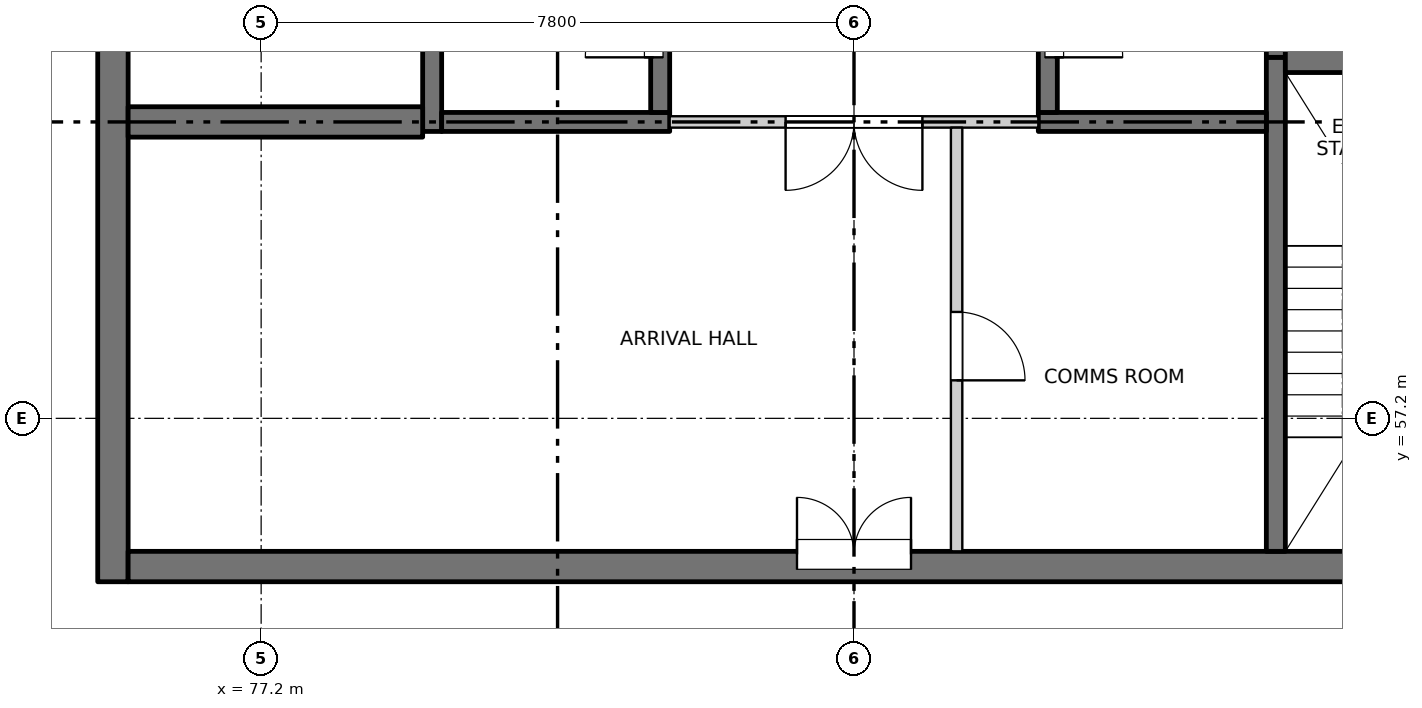
"""IFC4 building model, lengths in metres.
Left out: names, types, materials, properties, quantities, classifications, styles, units other than length and angle.
Written with IfcOpenShell. Run it as: python <this file> out.ifc"""

import sys

from ifc_helpers import new_model, si_unit, direction, frame, frame_2d, origin, place, context, subcontext, project, spatial, rectangle, extrude, element, fill, save


model = new_model("IFC4")
c1 = context("Model", 3, precision=1e-05, world=origin(), true_north=direction((0.0, 1.0)))
c2 = subcontext(c1, "Body", "Model", "MODEL_VIEW")
j1 = project(units=[si_unit("LENGTHUNIT", "METRE"), si_unit("PLANEANGLEUNIT", "RADIAN")], contexts=[c1])
p1 = place(None, origin())
s1 = spatial("IfcSite", under=j1, at=p1, CompositionType="ELEMENT")
p2 = place(p1, origin())
s2 = spatial("IfcBuilding", under=s1, at=p2, CompositionType="ELEMENT")
p3 = place(p2, frame((0.0, 0.0, 249.4)))
s3 = spatial("IfcBuildingStorey", under=s2, at=p3, CompositionType="ELEMENT", Elevation=249.4)
p4 = place(p3, frame((75.25, 55.05, -0.25), z_axis=(0.0, 0.0, 1.0), x_axis=(0.0, 1.0, 0.0)))
e1 = element("IfcWall", 1, at=p4, inside=s3, PredefinedType="SOLIDWALL", context=c2, shape_type="SweptSolid", body=[
    extrude(rectangle(XDim=22.25, YDim=0.4, at=frame_2d((11.125, 0.0))), origin(), (0.0, 0.0, 1.0), 3.4),
])
p5 = place(p4, frame((7.4, 0.0, 0.25)))
e2 = element("IfcOpeningElement", 2, at=p5, cuts=e1, PredefinedType="OPENING", context=c2, shape_type="SweptSolid", body=[
    extrude(rectangle(XDim=0.9, YDim=2.1, at=frame_2d((0.45, 1.05))), frame((0.0, 0.21, 0.0), z_axis=(0.0, -1.0, 0.0), x_axis=(1.0, 0.0, 0.0)), (0.0, 0.0, 1.0), 0.42),
])
p6 = place(p4, frame((12.05, 0.0, 0.25)))
e3 = element("IfcOpeningElement", 3, at=p6, cuts=e1, PredefinedType="OPENING", context=c2, shape_type="SweptSolid", body=[
    extrude(rectangle(XDim=0.9, YDim=2.1, at=frame_2d((0.45, 1.05))), frame((0.0, 0.21, 0.0), z_axis=(0.0, -1.0, 0.0), x_axis=(1.0, 0.0, 0.0)), (0.0, 0.0, 1.0), 0.42),
])
p7 = place(p4, frame((16.55, 0.0, 0.25)))
e4 = element("IfcOpeningElement", 4, at=p7, cuts=e1, PredefinedType="OPENING", context=c2, shape_type="SweptSolid", body=[
    extrude(rectangle(XDim=0.9, YDim=2.1, at=frame_2d((0.45, 1.05))), frame((0.0, 0.21, 0.0), z_axis=(0.0, -1.0, 0.0), x_axis=(1.0, 0.0, 0.0)), (0.0, 0.0, 1.0), 0.42),
])
p8 = place(p4, frame((20.0, 0.0, 0.25)))
e5 = element("IfcOpeningElement", 5, at=p8, cuts=e1, PredefinedType="OPENING", context=c2, shape_type="SweptSolid", body=[
    extrude(rectangle(XDim=0.9, YDim=2.1, at=frame_2d((0.45, 1.05))), frame((0.0, 0.21, 0.0), z_axis=(0.0, -1.0, 0.0), x_axis=(1.0, 0.0, 0.0)), (0.0, 0.0, 1.0), 0.42),
])
p9 = place(p3, frame((75.45, 55.25, -0.25), z_axis=(0.0, 0.0, 1.0), x_axis=(1.0, 0.0, 0.0)))
e6 = element("IfcWall", 6, at=p9, inside=s3, PredefinedType="SOLIDWALL", context=c2, shape_type="SweptSolid", body=[
    extrude(rectangle(XDim=19.1, YDim=0.4, at=frame_2d((9.55, 0.0))), origin(), (0.0, 0.0, 1.0), 3.4),
])
p10 = place(p9, frame((8.8, 0.0, 0.25)))
e7 = element("IfcOpeningElement", 7, at=p10, cuts=e6, PredefinedType="OPENING", context=c2, shape_type="SweptSolid", body=[
    extrude(rectangle(XDim=1.5, YDim=2.1, at=frame_2d((0.75, 1.05))), frame((0.0, 0.21, 0.0), z_axis=(0.0, -1.0, 0.0), x_axis=(1.0, 0.0, 0.0)), (0.0, 0.0, 1.0), 0.42),
])
p11 = place(p3, frame((79.45, 60.975, -0.25), z_axis=(0.0, 0.0, 1.0), x_axis=(0.0, 1.0, 0.0)))
e8 = element("IfcWall", 8, at=p11, inside=s3, PredefinedType="SOLIDWALL", context=c2, shape_type="SweptSolid", body=[
    extrude(rectangle(XDim=16.325, YDim=0.25, at=frame_2d((8.163, 0.0))), origin(), (0.0, 0.0, 1.0), 3.4),
])
p12 = place(p3, frame((90.55, 55.45, -0.25), z_axis=(0.0, 0.0, 1.0), x_axis=(0.0, 1.0, 0.0)))
e9 = element("IfcWall", 9, at=p12, inside=s3, PredefinedType="SOLIDWALL", context=c2, shape_type="SweptSolid", body=[
    extrude(rectangle(XDim=6.5, YDim=0.25, at=frame_2d((3.25, 0.0))), origin(), (0.0, 0.0, 1.0), 3.4),
])
p13 = place(p3, frame((90.55, 61.95, -0.25), z_axis=(0.0, 0.0, 1.0), x_axis=(0.0, 1.0, 0.0)))
e10 = element("IfcWall", 10, at=p13, inside=s3, PredefinedType="SOLIDWALL", context=c2, shape_type="SweptSolid", body=[
    extrude(rectangle(XDim=15.35, YDim=0.25, at=frame_2d((7.675, 0.0))), origin(), (0.0, 0.0, 1.0), 3.4),
])
p14 = place(p3, frame((79.575, 61.1, -0.25), z_axis=(0.0, 0.0, 1.0), x_axis=(1.0, 0.0, 0.0)))
e11 = element("IfcWall", 11, at=p14, inside=s3, PredefinedType="SOLIDWALL", context=c2, shape_type="SweptSolid", body=[
    extrude(rectangle(XDim=3.0, YDim=0.25, at=frame_2d((1.5, 0.0))), origin(), (0.0, 0.0, 1.0), 3.4),
])
p15 = place(p3, frame((82.45, 61.225, -0.25), z_axis=(0.0, 0.0, 1.0), x_axis=(0.0, 1.0, 0.0)))
e12 = element("IfcWall", 12, at=p15, inside=s3, PredefinedType="SOLIDWALL", context=c2, shape_type="SweptSolid", body=[
    extrude(rectangle(XDim=2.35, YDim=0.25, at=frame_2d((1.175, 0.0))), origin(), (0.0, 0.0, 1.0), 3.4),
])
p16 = place(p15, frame((0.725, 0.0, 0.25)))
e13 = element("IfcOpeningElement", 13, at=p16, cuts=e12, PredefinedType="OPENING", context=c2, shape_type="SweptSolid", body=[
    extrude(rectangle(XDim=0.9, YDim=2.1, at=frame_2d((0.45, 1.05))), frame((0.0, 0.135, 0.0), z_axis=(0.0, -1.0, 0.0), x_axis=(1.0, 0.0, 0.0)), (0.0, 0.0, 1.0), 0.27),
])
p17 = place(p3, frame((87.425, 61.1, -0.25), z_axis=(0.0, 0.0, 1.0), x_axis=(1.0, 0.0, 0.0)))
e14 = element("IfcWall", 14, at=p17, inside=s3, PredefinedType="SOLIDWALL", context=c2, shape_type="SweptSolid", body=[
    extrude(rectangle(XDim=3.0, YDim=0.25, at=frame_2d((1.5, 0.0))), origin(), (0.0, 0.0, 1.0), 3.4),
])
p18 = place(p3, frame((87.55, 61.225, -0.25), z_axis=(0.0, 0.0, 1.0), x_axis=(0.0, 1.0, 0.0)))
e15 = element("IfcWall", 15, at=p18, inside=s3, PredefinedType="SOLIDWALL", context=c2, shape_type="SweptSolid", body=[
    extrude(rectangle(XDim=2.35, YDim=0.25, at=frame_2d((1.175, 0.0))), origin(), (0.0, 0.0, 1.0), 3.4),
])
p19 = place(p18, frame((0.725, 0.0, 0.25)))
e16 = element("IfcOpeningElement", 16, at=p19, cuts=e15, PredefinedType="OPENING", context=c2, shape_type="SweptSolid", body=[
    extrude(rectangle(XDim=0.9, YDim=2.1, at=frame_2d((0.45, 1.05))), frame((0.0, 0.135, 0.0), z_axis=(0.0, -1.0, 0.0), x_axis=(1.0, 0.0, 0.0)), (0.0, 0.0, 1.0), 0.27),
])
for number, where, z_axis, x_axis in (
    (17, (75.45, 61.1, -0.25), (0.0, 0.0, 1.0), (1.0, 0.0, 0.0)),
    (18, (90.675, 61.95, -0.25), (0.0, 0.0, 1.0), (1.0, 0.0, 0.0)),
):
    element("IfcWall", number, at=place(p3, frame(where, z_axis=z_axis, x_axis=x_axis)), inside=s3, PredefinedType="SOLIDWALL", context=c2, shape_type="SweptSolid", body=[
        extrude(rectangle(XDim=3.875, YDim=0.4, at=frame_2d((1.938, 0.0))), origin(), (0.0, 0.0, 1.0), 3.4),
    ])
p20 = place(p3, frame((82.575, 61.1, 0.0), z_axis=(0.0, 0.0, 1.0), x_axis=(1.0, 0.0, 0.0)))
e19 = element("IfcWall", 19, at=p20, inside=s3, PredefinedType="PARTITIONING", context=c2, shape_type="SweptSolid", body=[
    extrude(rectangle(XDim=4.85, YDim=0.15, at=frame_2d((2.425, 0.0))), origin(), (0.0, 0.0, 1.0), 3.15),
])
p21 = place(p20, frame((1.525, 0.0, 0.0)))
e20 = element("IfcOpeningElement", 20, at=p21, cuts=e19, PredefinedType="OPENING", context=c2, shape_type="SweptSolid", body=[
    extrude(rectangle(XDim=1.8, YDim=2.1, at=frame_2d((0.9, 1.05))), frame((0.0, 0.085, 0.0), z_axis=(0.0, -1.0, 0.0), x_axis=(1.0, 0.0, 0.0)), (0.0, 0.0, 1.0), 0.17),
])
p22 = place(p3, frame((86.35, 55.45, 0.0), z_axis=(0.0, 0.0, 1.0), x_axis=(0.0, 1.0, 0.0)))
e21 = element("IfcWall", 21, at=p22, inside=s3, PredefinedType="PARTITIONING", context=c2, shape_type="SweptSolid", body=[
    extrude(rectangle(XDim=5.575, YDim=0.15, at=frame_2d((2.788, 0.0))), origin(), (0.0, 0.0, 1.0), 3.15),
])
p23 = place(p22, frame((2.25, 0.0, 0.0)))
e22 = element("IfcOpeningElement", 22, at=p23, cuts=e21, PredefinedType="OPENING", context=c2, shape_type="SweptSolid", body=[
    extrude(rectangle(XDim=0.9, YDim=2.1, at=frame_2d((0.45, 1.05))), frame((0.0, 0.085, 0.0), z_axis=(0.0, -1.0, 0.0), x_axis=(1.0, 0.0, 0.0)), (0.0, 0.0, 1.0), 0.17),
])
p24 = place(p10, origin())
e23 = element("IfcDoor", 23, at=p24, inside=s3, OperationType="DOUBLE_DOOR_SINGLE_SWING", PredefinedType="DOOR", context=c2, shape_type="SweptSolid", body=[
    extrude(rectangle(XDim=1.5, YDim=2.1, at=frame_2d((0.75, 1.05))), frame((0.0, 0.185, 0.0), z_axis=(0.0, -1.0, 0.0), x_axis=(1.0, 0.0, 0.0)), (0.0, 0.0, 1.0), 0.05),
])
fill(e7, e23)
p25 = place(p23, origin())
e24 = element("IfcDoor", 24, at=p25, inside=s3, OperationType="SINGLE_SWING_RIGHT", PredefinedType="DOOR", context=c2, shape_type="SweptSolid", body=[
    extrude(rectangle(XDim=0.9, YDim=2.1, at=frame_2d((0.45, 1.05))), frame((0.0, 0.025, 0.0), z_axis=(0.0, -1.0, 0.0), x_axis=(1.0, 0.0, 0.0)), (0.0, 0.0, 1.0), 0.05),
])
fill(e22, e24)
p26 = place(p21, origin())
e25 = element("IfcDoor", 25, at=p26, inside=s3, OperationType="DOUBLE_DOOR_SINGLE_SWING", PredefinedType="DOOR", context=c2, shape_type="SweptSolid", body=[
    extrude(rectangle(XDim=1.8, YDim=2.1, at=frame_2d((0.9, 1.05))), frame((0.0, 0.025, 0.0), z_axis=(0.0, -1.0, 0.0), x_axis=(1.0, 0.0, 0.0)), (0.0, 0.0, 1.0), 0.05),
])
fill(e20, e25)
p27 = place(p16, origin())
e26 = element("IfcDoor", 26, at=p27, inside=s3, OperationType="SINGLE_SWING_LEFT", PredefinedType="DOOR", context=c2, shape_type="SweptSolid", body=[
    extrude(rectangle(XDim=0.9, YDim=2.1, at=frame_2d((0.45, 1.05))), frame((0.0, 0.11, 0.0), z_axis=(0.0, -1.0, 0.0), x_axis=(1.0, 0.0, 0.0)), (0.0, 0.0, 1.0), 0.05),
])
fill(e13, e26)
p28 = place(p19, origin())
e27 = element("IfcDoor", 27, at=p28, inside=s3, OperationType="SINGLE_SWING_RIGHT", PredefinedType="DOOR", context=c2, shape_type="SweptSolid", body=[
    extrude(rectangle(XDim=0.9, YDim=2.1, at=frame_2d((0.45, 1.05))), frame((0.0, -0.06, 0.0), z_axis=(0.0, -1.0, 0.0), x_axis=(1.0, 0.0, 0.0)), (0.0, 0.0, 1.0), 0.05),
])
fill(e16, e27)
save(model, sys.argv[1])
